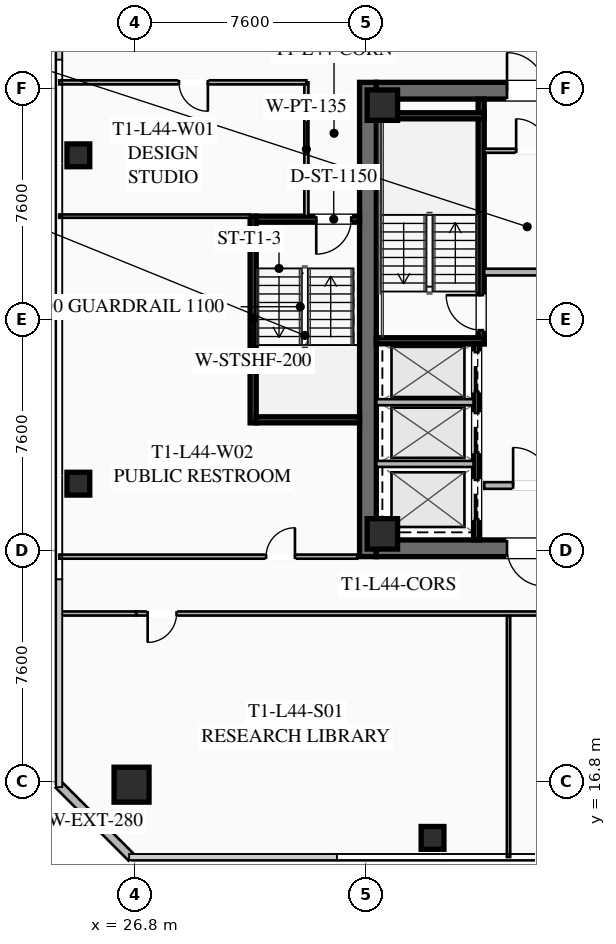
"""IFC4 building model, lengths in metres.
Left out: names, types, materials, properties, quantities, classifications, styles, units other than length and angle.
Written with IfcOpenShell. Run it as: python <this file> out.ifc"""

import sys

from ifc_helpers import new_model, si_unit, direction, frame, frame_2d, origin, origin_2d, place, context, subcontext, project, spatial, rectangle, hollow_rectangle, extrude, element, fill, save


model = new_model("IFC4")
c1 = context("Model", 3, precision=1e-05, world=origin(), true_north=direction((0.0, 1.0)))
c2 = subcontext(c1, "Body", "Model", "MODEL_VIEW")
j1 = project(units=[si_unit("LENGTHUNIT", "METRE"), si_unit("PLANEANGLEUNIT", "RADIAN")], contexts=[c1])
p1 = place(None, origin())
s1 = spatial("IfcSite", under=j1, at=p1, CompositionType="ELEMENT")
p2 = place(p1, origin())
s2 = spatial("IfcBuilding", under=s1, at=p2, CompositionType="ELEMENT")
p3 = place(p2, frame((0.0, 0.0, 164.1)))
s3 = spatial("IfcBuildingStorey", under=s2, at=p3, CompositionType="ELEMENT", Elevation=164.1)
p4 = place(p3, frame((34.475, 24.2, 0.0), z_axis=(0.0, 0.0, 1.0), x_axis=(0.0, 1.0, 0.0)))
e1 = element("IfcWall", 1, at=p4, inside=s3, PredefinedType="SHEAR", context=c2, shape_type="SweptSolid", body=[
    extrude(rectangle(XDim=15.6, YDim=0.55, at=frame_2d((7.8, 0.0))), origin(), (0.0, 0.0, 1.0), 3.55),
])
p5 = place(p3, frame((49.25, 24.475, 0.0), z_axis=(0.0, 0.0, 1.0), x_axis=(-1.0, 0.0, 0.0)))
e2 = element("IfcWall", 2, at=p5, inside=s3, PredefinedType="SHEAR", context=c2, shape_type="SweptSolid", body=[
    extrude(rectangle(XDim=14.5, YDim=0.55, at=frame_2d((7.25, 0.0))), origin(), (0.0, 0.0, 1.0), 3.55),
])
p6 = place(p5, frame((8.95, 0.0, 0.0)))
e3 = element("IfcOpeningElement", 3, at=p6, cuts=e2, PredefinedType="OPENING", context=c2, shape_type="SweptSolid", body=[
    extrude(rectangle(XDim=1.25, YDim=2.25, at=frame_2d((0.625, 1.125))), frame((0.0, 0.285, 0.0), z_axis=(0.0, -1.0, 0.0), x_axis=(1.0, 0.0, 0.0)), (0.0, 0.0, 1.0), 0.57),
])
p7 = place(p5, frame((3.9, 0.0, 0.0)))
e4 = element("IfcOpeningElement", 4, at=p7, cuts=e2, PredefinedType="OPENING", context=c2, shape_type="SweptSolid", body=[
    extrude(rectangle(XDim=1.25, YDim=2.25, at=frame_2d((0.625, 1.125))), frame((0.0, 0.285, 0.0), z_axis=(0.0, -1.0, 0.0), x_axis=(1.0, 0.0, 0.0)), (0.0, 0.0, 1.0), 0.57),
])
p8 = place(p3, frame((34.75, 39.525, 0.0), z_axis=(0.0, 0.0, 1.0), x_axis=(1.0, 0.0, 0.0)))
e5 = element("IfcWall", 5, at=p8, inside=s3, PredefinedType="SHEAR", context=c2, shape_type="SweptSolid", body=[
    extrude(rectangle(XDim=14.5, YDim=0.55, at=frame_2d((7.25, 0.0))), origin(), (0.0, 0.0, 1.0), 3.55),
])
p9 = place(p8, frame((4.3, 0.0, 0.0)))
e6 = element("IfcOpeningElement", 6, at=p9, cuts=e5, PredefinedType="OPENING", context=c2, shape_type="SweptSolid", body=[
    extrude(rectangle(XDim=1.25, YDim=2.25, at=frame_2d((0.625, 1.125))), frame((0.0, 0.285, 0.0), z_axis=(0.0, -1.0, 0.0), x_axis=(1.0, 0.0, 0.0)), (0.0, 0.0, 1.0), 0.57),
])
p10 = place(p8, frame((9.35, 0.0, 0.0)))
e7 = element("IfcOpeningElement", 7, at=p10, cuts=e5, PredefinedType="OPENING", context=c2, shape_type="SweptSolid", body=[
    extrude(rectangle(XDim=1.25, YDim=2.25, at=frame_2d((0.625, 1.125))), frame((0.0, 0.285, 0.0), z_axis=(0.0, -1.0, 0.0), x_axis=(1.0, 0.0, 0.0)), (0.0, 0.0, 1.0), 0.57),
])
for number, where, z_axis, x_axis in (
    (8, (34.95, 24.95, 0.0), (0.0, 0.0, 1.0), (1.0, 0.0, 0.0)),
    (9, (34.95, 39.05, 0.0), (0.0, 0.0, 1.0), (1.0, 0.0, 0.0)),
):
    element("IfcColumn", number, at=place(p3, frame(where, z_axis=z_axis, x_axis=x_axis)), inside=s3, PredefinedType="COLUMN", context=c2, shape_type="SweptSolid", body=[
        extrude(hollow_rectangle(XDim=1.0, YDim=1.0, WallThickness=0.04, at=origin_2d()), origin(), (0.0, 0.0, 1.0), 3.37),
    ])
p11 = place(p3, frame((26.7, 16.7, 0.0), z_axis=(0.0, 0.0, 1.0), x_axis=(1.0, 0.0, 0.0)))
e10 = element("IfcColumn", 10, at=p11, inside=s3, PredefinedType="COLUMN", context=c2, shape_type="SweptSolid", body=[
    extrude(hollow_rectangle(XDim=1.15, YDim=1.15, WallThickness=0.045, at=origin_2d()), origin(), (0.0, 0.0, 1.0), 3.37),
])
for number, where, z_axis, x_axis in (
    (11, (36.6, 14.95, 0.0), (0.0, 0.0, 1.0), (1.0, 0.0, 0.0)),
    (12, (24.95, 37.4, 0.0), (0.0, 0.0, 1.0), (1.0, 0.0, 0.0)),
    (13, (24.95, 26.6, 0.0), (0.0, 0.0, 1.0), (1.0, 0.0, 0.0)),
):
    element("IfcColumn", number, at=place(p3, frame(where, z_axis=z_axis, x_axis=x_axis)), inside=s3, PredefinedType="COLUMN", context=c2, shape_type="SweptSolid", body=[
        extrude(hollow_rectangle(XDim=0.75, YDim=0.75, WallThickness=0.032, at=origin_2d()), origin(), (0.0, 0.0, 1.0), 3.37),
    ])
p12 = place(p3, frame((26.7, 14.3, 0.0), z_axis=(0.0, 0.0, 1.0), x_axis=(-0.707106781187, 0.707106781187, 0.0)))
e14 = element("IfcWall", 14, at=p12, inside=s3, PredefinedType="SOLIDWALL", context=c2, shape_type="SweptSolid", body=[
    extrude(rectangle(XDim=3.394, YDim=0.28, at=frame_2d((1.697, 0.0))), origin(), (0.0, 0.0, 1.0), 3.37),
])
p13 = place(p3, frame((38.2, 31.2, 0.0), z_axis=(0.0, 0.0, 1.0), x_axis=(0.0, 1.0, 0.0)))
e15 = element("IfcWall", 15, at=p13, inside=s3, PredefinedType="SHEAR", context=c2, shape_type="SweptSolid", body=[
    extrude(rectangle(XDim=8.05, YDim=0.2, at=frame_2d((4.025, 0.0))), origin(), (0.0, 0.0, 1.0), 3.37),
])
p14 = place(p13, frame((0.45, 0.0, 0.0)))
e16 = element("IfcOpeningElement", 16, at=p14, cuts=e15, PredefinedType="OPENING", context=c2, shape_type="SweptSolid", body=[
    extrude(rectangle(XDim=1.15, YDim=2.2, at=frame_2d((0.575, 1.1))), frame((0.0, 0.11, 0.0), z_axis=(0.0, -1.0, 0.0), x_axis=(1.0, 0.0, 0.0)), (0.0, 0.0, 1.0), 0.22),
])
for number, where, z_axis, x_axis in (
    (17, (34.75, 31.3, 0.0), (0.0, 0.0, 1.0), (1.0, 0.0, 0.0)),
    (18, (34.75, 38.7, 0.0), (0.0, 0.0, 1.0), (1.0, 0.0, 0.0)),
):
    element("IfcWall", number, at=place(p3, frame(where, z_axis=z_axis, x_axis=x_axis)), inside=s3, PredefinedType="SHEAR", context=c2, shape_type="SweptSolid", body=[
        extrude(rectangle(XDim=3.55, YDim=0.2, at=frame_2d((1.775, 0.0))), origin(), (0.0, 0.0, 1.0), 3.37),
    ])
p15 = place(p3, frame((38.3, 33.56, 0.0), z_axis=(0.0, 0.0, 1.0), x_axis=(1.0, 0.0, 0.0)))
e19 = element("IfcWall", 19, at=p15, inside=s3, PredefinedType="SOLIDWALL", context=c2, shape_type="SweptSolid", body=[
    extrude(rectangle(XDim=3.15, YDim=0.22, at=frame_2d((1.575, 0.0))), origin(), (0.0, 0.0, 1.0), 2.723),
])
p16 = place(p3, frame((38.3, 26.54, 0.0), z_axis=(0.0, 0.0, 1.0), x_axis=(1.0, 0.0, 0.0)))
e20 = element("IfcWall", 20, at=p16, inside=s3, PredefinedType="SOLIDWALL", context=c2, shape_type="SweptSolid", body=[
    extrude(rectangle(XDim=3.15, YDim=0.22, at=frame_2d((1.575, 0.0))), origin(), (0.0, 0.0, 1.0), 2.723),
])
p17 = place(p16, frame((0.95, 0.0, 0.0)))
e21 = element("IfcOpeningElement", 21, at=p17, cuts=e20, PredefinedType="OPENING", context=c2, shape_type="SweptSolid", body=[
    extrude(rectangle(XDim=1.25, YDim=2.25, at=frame_2d((0.625, 1.125))), frame((0.0, 0.12, 0.0), z_axis=(0.0, -1.0, 0.0), x_axis=(1.0, 0.0, 0.0)), (0.0, 0.0, 1.0), 0.24),
])
p18 = place(p3, frame((38.05, 24.75, 0.0), z_axis=(0.0, 0.0, 1.0), x_axis=(0.0, 1.0, 0.0)))
e22 = element("IfcWall", 22, at=p18, inside=s3, PredefinedType="SHEAR", context=c2, shape_type="SweptSolid", body=[
    extrude(rectangle(XDim=6.45, YDim=0.2, at=frame_2d((3.225, 0.0))), origin(), (0.0, 0.0, 1.0), 3.37),
])
p19 = place(p18, frame((4.875, 0.0, 0.0)))
e23 = element("IfcOpeningElement", 23, at=p19, cuts=e22, PredefinedType="OPENING", context=c2, shape_type="SweptSolid", body=[
    extrude(rectangle(XDim=1.3, YDim=2.25, at=frame_2d((0.65, 1.125))), frame((0.0, 0.11, 0.0), z_axis=(0.0, -1.0, 0.0), x_axis=(1.0, 0.0, 0.0)), (0.0, 0.0, 1.0), 0.22),
])
p20 = place(p18, frame((2.875, 0.0, 0.0)))
e24 = element("IfcOpeningElement", 24, at=p20, cuts=e22, PredefinedType="OPENING", context=c2, shape_type="SweptSolid", body=[
    extrude(rectangle(XDim=1.3, YDim=2.25, at=frame_2d((0.65, 1.125))), frame((0.0, 0.11, 0.0), z_axis=(0.0, -1.0, 0.0), x_axis=(1.0, 0.0, 0.0)), (0.0, 0.0, 1.0), 0.22),
])
p21 = place(p18, frame((0.675, 0.0, 0.0)))
e25 = element("IfcOpeningElement", 25, at=p21, cuts=e22, PredefinedType="OPENING", context=c2, shape_type="SweptSolid", body=[
    extrude(rectangle(XDim=1.3, YDim=2.25, at=frame_2d((0.65, 1.125))), frame((0.0, 0.11, 0.0), z_axis=(0.0, -1.0, 0.0), x_axis=(1.0, 0.0, 0.0)), (0.0, 0.0, 1.0), 0.22),
])
for number, where, z_axis, x_axis in (
    (26, (34.75, 27.25, 0.0), (0.0, 0.0, 1.0), (1.0, 0.0, 0.0)),
    (27, (34.75, 29.28, 0.0), (0.0, 0.0, 1.0), (1.0, 0.0, 0.0)),
):
    element("IfcWall", number, at=place(p3, frame(where, z_axis=z_axis, x_axis=x_axis)), inside=s3, PredefinedType="SOLIDWALL", context=c2, shape_type="SweptSolid", body=[
        extrude(rectangle(XDim=3.2, YDim=0.2, at=frame_2d((1.6, 0.0))), origin(), (0.0, 0.0, 1.0), 3.37),
    ])
p22 = place(p3, frame((38.3, 37.55, 0.0), z_axis=(0.0, 0.0, 1.0), x_axis=(1.0, 0.0, 0.0)))
e28 = element("IfcWall", 28, at=p22, inside=s3, PredefinedType="PARTITIONING", context=c2, shape_type="SweptSolid", body=[
    extrude(rectangle(XDim=3.15, YDim=0.135, at=frame_2d((1.575, 0.0))), origin(), (0.0, 0.0, 1.0), 2.723),
])
p23 = place(p22, frame((1.05, 0.0, 0.0)))
e29 = element("IfcOpeningElement", 29, at=p23, cuts=e28, PredefinedType="OPENING", context=c2, shape_type="SweptSolid", body=[
    extrude(rectangle(XDim=1.05, YDim=2.2, at=frame_2d((0.525, 1.1))), frame((0.0, 0.077, 0.0), z_axis=(0.0, -1.0, 0.0), x_axis=(1.0, 0.0, 0.0)), (0.0, 0.0, 1.0), 0.155),
])
p24 = place(p3, frame((30.7, 28.6, 0.0), z_axis=(0.0, 0.0, 1.0), x_axis=(0.0, 1.0, 0.0)))
e30 = element("IfcWall", 30, at=p24, inside=s3, PredefinedType="SHEAR", context=c2, shape_type="SweptSolid", body=[
    extrude(rectangle(XDim=6.8, YDim=0.2, at=frame_2d((3.4, 0.0))), origin(), (0.0, 0.0, 1.0), 3.37),
])
p25 = place(p3, frame((34.2, 35.3, 0.0), z_axis=(0.0, 0.0, 1.0), x_axis=(-1.0, 0.0, 0.0)))
e31 = element("IfcWall", 31, at=p25, inside=s3, PredefinedType="SHEAR", context=c2, shape_type="SweptSolid", body=[
    extrude(rectangle(XDim=3.4, YDim=0.2, at=frame_2d((1.7, 0.0))), origin(), (0.0, 0.0, 1.0), 3.37),
])
p26 = place(p25, frame((0.275, 0.0, 0.0)))
e32 = element("IfcOpeningElement", 32, at=p26, cuts=e31, PredefinedType="OPENING", context=c2, shape_type="SweptSolid", body=[
    extrude(rectangle(XDim=1.15, YDim=2.2, at=frame_2d((0.575, 1.1))), frame((0.0, 0.11, 0.0), z_axis=(0.0, -1.0, 0.0), x_axis=(1.0, 0.0, 0.0)), (0.0, 0.0, 1.0), 0.22),
])
p27 = place(p3, frame((30.8, 28.7, 0.0), z_axis=(0.0, 0.0, 1.0), x_axis=(1.0, 0.0, 0.0)))
e33 = element("IfcWall", 33, at=p27, inside=s3, PredefinedType="SHEAR", context=c2, shape_type="SweptSolid", body=[
    extrude(rectangle(XDim=3.4, YDim=0.2, at=frame_2d((1.7, 0.0))), origin(), (0.0, 0.0, 1.0), 3.37),
])
p28 = place(p3, frame((32.45, 35.4, 0.0), z_axis=(0.0, 0.0, 1.0), x_axis=(0.0, 1.0, 0.0)))
e34 = element("IfcWall", 34, at=p28, inside=s3, PredefinedType="PARTITIONING", context=c2, shape_type="SweptSolid", body=[
    extrude(rectangle(XDim=4.4, YDim=0.135, at=frame_2d((2.2, 0.0))), origin(), (0.0, 0.0, 1.0), 2.723),
])
p29 = place(p3, frame((57.15, 22.33, 0.0), z_axis=(0.0, 0.0, 1.0), x_axis=(-1.0, 0.0, 0.0)))
e35 = element("IfcWall", 35, at=p29, inside=s3, PredefinedType="PARTITIONING", context=c2, shape_type="SweptSolid", body=[
    extrude(rectangle(XDim=30.3, YDim=0.135, at=frame_2d((15.15, 0.0))), origin(), (0.0, 0.0, 1.0), 2.723),
])
p30 = place(p29, frame((28.97, 0.0, 0.0)))
e36 = element("IfcOpeningElement", 36, at=p30, cuts=e35, PredefinedType="OPENING", context=c2, shape_type="SweptSolid", body=[
    extrude(rectangle(XDim=0.95, YDim=2.05, at=frame_2d((0.475, 1.025))), frame((0.0, 0.077, 0.0), z_axis=(0.0, -1.0, 0.0), x_axis=(1.0, 0.0, 0.0)), (0.0, 0.0, 1.0), 0.155),
])
p31 = place(p29, frame((14.392, 0.0, 0.0)))
e37 = element("IfcOpeningElement", 37, at=p31, cuts=e35, PredefinedType="OPENING", context=c2, shape_type="SweptSolid", body=[
    extrude(rectangle(XDim=0.95, YDim=2.05, at=frame_2d((0.475, 1.025))), frame((0.0, 0.077, 0.0), z_axis=(0.0, -1.0, 0.0), x_axis=(1.0, 0.0, 0.0)), (0.0, 0.0, 1.0), 0.155),
])
p32 = place(p29, frame((0.38, 0.0, 0.0)))
e38 = element("IfcOpeningElement", 38, at=p32, cuts=e35, PredefinedType="OPENING", context=c2, shape_type="SweptSolid", body=[
    extrude(rectangle(XDim=0.95, YDim=2.05, at=frame_2d((0.475, 1.025))), frame((0.0, 0.077, 0.0), z_axis=(0.0, -1.0, 0.0), x_axis=(1.0, 0.0, 0.0)), (0.0, 0.0, 1.0), 0.155),
])
p33 = place(p3, frame((24.32, 22.33, 0.0), z_axis=(0.0, 0.0, 1.0), x_axis=(1.0, 0.0, 0.0)))
e39 = element("IfcWall", 39, at=p33, inside=s3, PredefinedType="PARTITIONING", context=c2, shape_type="SweptSolid", body=[
    extrude(rectangle(XDim=2.53, YDim=0.135, at=frame_2d((1.265, 0.0))), origin(), (0.0, 0.0, 1.0), 2.723),
])
p34 = place(p3, frame((39.1, 14.32, 0.0), z_axis=(0.0, 0.0, 1.0), x_axis=(0.0, 1.0, 0.0)))
e40 = element("IfcWall", 40, at=p34, inside=s3, PredefinedType="PARTITIONING", context=c2, shape_type="SweptSolid", body=[
    extrude(rectangle(XDim=7.93, YDim=0.11, at=frame_2d((3.965, 0.0))), origin(), (0.0, 0.0, 1.0), 2.723),
])
p35 = place(p3, frame((32.45, 39.8, 0.0), z_axis=(0.0, 0.0, 1.0), x_axis=(-1.0, 0.0, 0.0)))
e41 = element("IfcWall", 41, at=p35, inside=s3, PredefinedType="PARTITIONING", context=c2, shape_type="SweptSolid", body=[
    extrude(rectangle(XDim=8.13, YDim=0.135, at=frame_2d((4.065, 0.0))), origin(), (0.0, 0.0, 1.0), 2.723),
])
p36 = place(p35, frame((3.24, 0.0, 0.0)))
e42 = element("IfcOpeningElement", 42, at=p36, cuts=e41, PredefinedType="OPENING", context=c2, shape_type="SweptSolid", body=[
    extrude(rectangle(XDim=0.95, YDim=2.05, at=frame_2d((0.475, 1.025))), frame((0.0, 0.077, 0.0), z_axis=(0.0, -1.0, 0.0), x_axis=(1.0, 0.0, 0.0)), (0.0, 0.0, 1.0), 0.155),
])
p37 = place(p3, frame((24.32, 24.2, 0.0), z_axis=(0.0, 0.0, 1.0), x_axis=(1.0, 0.0, 0.0)))
e43 = element("IfcWall", 43, at=p37, inside=s3, PredefinedType="PARTITIONING", context=c2, shape_type="SweptSolid", body=[
    extrude(rectangle(XDim=9.8, YDim=0.135, at=frame_2d((4.9, 0.0))), origin(), (0.0, 0.0, 1.0), 2.723),
])
p38 = place(p37, frame((6.805, 0.0, 0.0)))
e44 = element("IfcOpeningElement", 44, at=p38, cuts=e43, PredefinedType="OPENING", context=c2, shape_type="SweptSolid", body=[
    extrude(rectangle(XDim=0.95, YDim=2.05, at=frame_2d((0.475, 1.025))), frame((0.0, 0.077, 0.0), z_axis=(0.0, -1.0, 0.0), x_axis=(1.0, 0.0, 0.0)), (0.0, 0.0, 1.0), 0.155),
])
p39 = place(p3, frame((30.6, 35.4, 0.0), z_axis=(0.0, 0.0, 1.0), x_axis=(-1.0, 0.0, 0.0)))
e45 = element("IfcWall", 45, at=p39, inside=s3, PredefinedType="PARTITIONING", context=c2, shape_type="SweptSolid", body=[
    extrude(rectangle(XDim=6.28, YDim=0.11, at=frame_2d((3.14, 0.0))), origin(), (0.0, 0.0, 1.0), 2.723),
])
p40 = place(p9, origin())
e46 = element("IfcDoor", 46, at=p40, inside=s3, OperationType="SINGLE_SWING_LEFT", PredefinedType="DOOR", context=c2, shape_type="SweptSolid", body=[
    extrude(rectangle(XDim=1.25, YDim=2.25, at=frame_2d((0.625, 1.125))), frame((0.0, 0.025, 0.0), z_axis=(0.0, -1.0, 0.0), x_axis=(1.0, 0.0, 0.0)), (0.0, 0.0, 1.0), 0.05),
])
fill(e6, e46)
p41 = place(p6, origin())
e47 = element("IfcDoor", 47, at=p41, inside=s3, OperationType="SINGLE_SWING_LEFT", PredefinedType="DOOR", context=c2, shape_type="SweptSolid", body=[
    extrude(rectangle(XDim=1.25, YDim=2.25, at=frame_2d((0.625, 1.125))), frame((0.0, 0.025, 0.0), z_axis=(0.0, -1.0, 0.0), x_axis=(1.0, 0.0, 0.0)), (0.0, 0.0, 1.0), 0.05),
])
fill(e3, e47)
p42 = place(p14, origin())
e48 = element("IfcDoor", 48, at=p42, inside=s3, OperationType="SINGLE_SWING_RIGHT", PredefinedType="DOOR", context=c2, shape_type="SweptSolid", body=[
    extrude(rectangle(XDim=1.15, YDim=2.2, at=frame_2d((0.575, 1.1))), frame((0.0, 0.025, 0.0), z_axis=(0.0, -1.0, 0.0), x_axis=(1.0, 0.0, 0.0)), (0.0, 0.0, 1.0), 0.05),
])
fill(e16, e48)
p43 = place(p17, origin())
e49 = element("IfcDoor", 49, at=p43, inside=s3, OperationType="SINGLE_SWING_LEFT", PredefinedType="DOOR", context=c2, shape_type="SweptSolid", body=[
    extrude(rectangle(XDim=1.25, YDim=2.25, at=frame_2d((0.625, 1.125))), frame((0.0, 0.025, 0.0), z_axis=(0.0, -1.0, 0.0), x_axis=(1.0, 0.0, 0.0)), (0.0, 0.0, 1.0), 0.05),
])
fill(e21, e49)
p44 = place(p23, origin())
e50 = element("IfcDoor", 50, at=p44, inside=s3, OperationType="SINGLE_SWING_LEFT", PredefinedType="DOOR", context=c2, shape_type="SweptSolid", body=[
    extrude(rectangle(XDim=1.05, YDim=2.2, at=frame_2d((0.525, 1.1))), frame((0.0, 0.025, 0.0), z_axis=(0.0, -1.0, 0.0), x_axis=(1.0, 0.0, 0.0)), (0.0, 0.0, 1.0), 0.05),
])
fill(e29, e50)
p45 = place(p26, origin())
e51 = element("IfcDoor", 51, at=p45, inside=s3, OperationType="SINGLE_SWING_RIGHT", PredefinedType="DOOR", context=c2, shape_type="SweptSolid", body=[
    extrude(rectangle(XDim=1.15, YDim=2.2, at=frame_2d((0.575, 1.1))), frame((0.0, 0.025, 0.0), z_axis=(0.0, -1.0, 0.0), x_axis=(1.0, 0.0, 0.0)), (0.0, 0.0, 1.0), 0.05),
])
fill(e32, e51)
p46 = place(p30, origin())
e52 = element("IfcDoor", 52, at=p46, inside=s3, OperationType="SINGLE_SWING_RIGHT", PredefinedType="DOOR", context=c2, shape_type="SweptSolid", body=[
    extrude(rectangle(XDim=0.95, YDim=2.05, at=frame_2d((0.475, 1.025))), frame((0.0, 0.025, 0.0), z_axis=(0.0, -1.0, 0.0), x_axis=(1.0, 0.0, 0.0)), (0.0, 0.0, 1.0), 0.05),
])
fill(e36, e52)
p47 = place(p36, origin())
e53 = element("IfcDoor", 53, at=p47, inside=s3, OperationType="SINGLE_SWING_LEFT", PredefinedType="DOOR", context=c2, shape_type="SweptSolid", body=[
    extrude(rectangle(XDim=0.95, YDim=2.05, at=frame_2d((0.475, 1.025))), frame((0.0, 0.025, 0.0), z_axis=(0.0, -1.0, 0.0), x_axis=(1.0, 0.0, 0.0)), (0.0, 0.0, 1.0), 0.05),
])
fill(e42, e53)
p48 = place(p38, origin())
e54 = element("IfcDoor", 54, at=p48, inside=s3, OperationType="SINGLE_SWING_RIGHT", PredefinedType="DOOR", context=c2, shape_type="SweptSolid", body=[
    extrude(rectangle(XDim=0.95, YDim=2.05, at=frame_2d((0.475, 1.025))), frame((0.0, 0.025, 0.0), z_axis=(0.0, -1.0, 0.0), x_axis=(1.0, 0.0, 0.0)), (0.0, 0.0, 1.0), 0.05),
])
fill(e44, e54)
p49 = place(p19, origin())
e55 = element("IfcDoor", 55, at=p49, inside=s3, OperationType="SLIDING_TO_LEFT", PredefinedType="DOOR", context=c2, shape_type="SweptSolid", body=[
    extrude(rectangle(XDim=1.3, YDim=2.25, at=frame_2d((0.65, 1.125))), frame((0.0, 0.025, 0.0), z_axis=(0.0, -1.0, 0.0), x_axis=(1.0, 0.0, 0.0)), (0.0, 0.0, 1.0), 0.05),
])
fill(e23, e55)
p50 = place(p20, origin())
e56 = element("IfcDoor", 56, at=p50, inside=s3, OperationType="SLIDING_TO_LEFT", PredefinedType="DOOR", context=c2, shape_type="SweptSolid", body=[
    extrude(rectangle(XDim=1.3, YDim=2.25, at=frame_2d((0.65, 1.125))), frame((0.0, 0.025, 0.0), z_axis=(0.0, -1.0, 0.0), x_axis=(1.0, 0.0, 0.0)), (0.0, 0.0, 1.0), 0.05),
])
fill(e24, e56)
p51 = place(p21, origin())
e57 = element("IfcDoor", 57, at=p51, inside=s3, OperationType="SLIDING_TO_LEFT", PredefinedType="DOOR", context=c2, shape_type="SweptSolid", body=[
    extrude(rectangle(XDim=1.3, YDim=2.25, at=frame_2d((0.65, 1.125))), frame((0.0, 0.025, 0.0), z_axis=(0.0, -1.0, 0.0), x_axis=(1.0, 0.0, 0.0)), (0.0, 0.0, 1.0), 0.05),
])
fill(e25, e57)
save(model, sys.argv[1])
